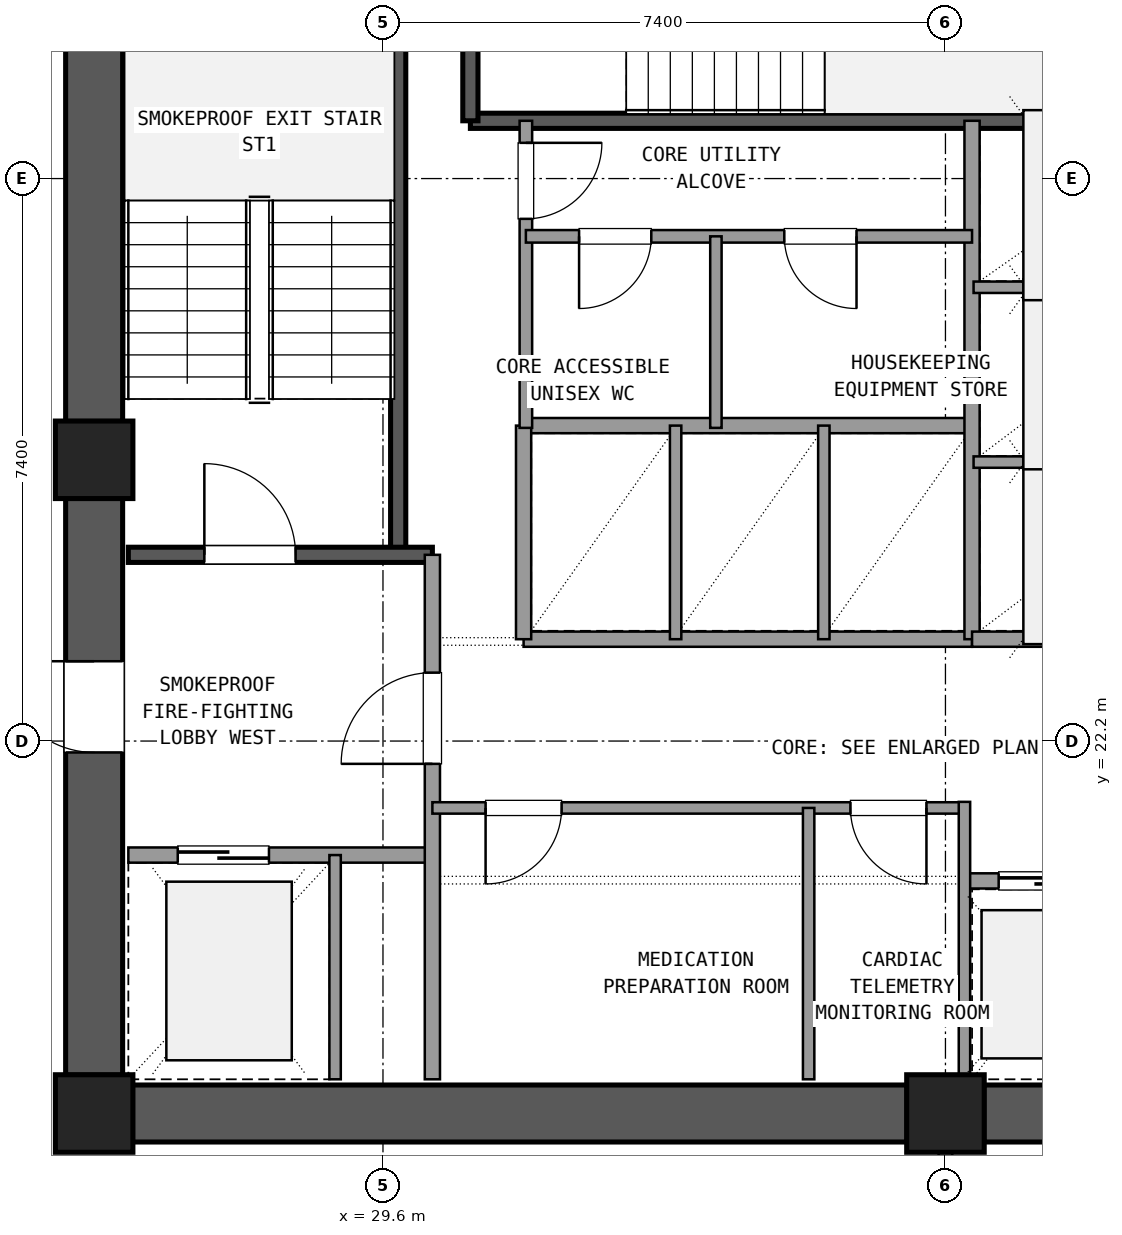
"""IFC4 building model, lengths in metres.
Left out: names, types, materials, properties, quantities, classifications, styles, units other than length and angle.
Written with IfcOpenShell. Run it as: python <this file> out.ifc"""

import sys

from ifc_helpers import new_model, si_unit, direction, frame, frame_2d, origin, origin_2d, place, context, subcontext, project, spatial, rectangle, extrude, element, fill, save


model = new_model("IFC4")
c1 = context("Model", 3, precision=1e-05, world=origin(), true_north=direction((0.0, 1.0)))
c2 = subcontext(c1, "Body", "Model", "MODEL_VIEW")
j1 = project(units=[si_unit("LENGTHUNIT", "METRE"), si_unit("PLANEANGLEUNIT", "RADIAN")], contexts=[c1])
p1 = place(None, origin())
s1 = spatial("IfcSite", under=j1, at=p1, CompositionType="ELEMENT")
p2 = place(p1, origin())
s2 = spatial("IfcBuilding", under=s1, at=p2, CompositionType="ELEMENT")
p3 = place(p2, frame((0.0, 0.0, 120.78)))
s3 = spatial("IfcBuildingStorey", under=s2, at=p3, CompositionType="ELEMENT", Elevation=120.78)
for number, where, z_axis, x_axis in (
    (1, (25.8, 17.3, 0.0), (0.0, 0.0, 1.0), (1.0, 0.0, 0.0)),
    (2, (37.0, 17.3, 0.0), (0.0, 0.0, 1.0), (1.0, 0.0, 0.0)),
    (3, (25.8, 25.9, 0.0), (0.0, 0.0, 1.0), (1.0, 0.0, 0.0)),
):
    element("IfcColumn", number, at=place(p3, frame(where, z_axis=z_axis, x_axis=x_axis)), inside=s3, PredefinedType="COLUMN", context=c2, shape_type="SweptSolid", body=[
        extrude(rectangle(XDim=1.02, YDim=1.02, at=origin_2d()), origin(), (0.0, 0.0, 1.0), 3.6),
    ])
for number, where, z_axis, x_axis in (
    (4, (26.305, 17.3, 0.0), (0.0, 0.0, 1.0), (1.0, 0.0, 0.0)),
    (5, (37.505, 17.3, 0.0), (0.0, 0.0, 1.0), (1.0, 0.0, 0.0)),
):
    element("IfcWall", number, at=place(p3, frame(where, z_axis=z_axis, x_axis=x_axis)), inside=s3, PredefinedType="SHEAR", context=c2, shape_type="SweptSolid", body=[
        extrude(rectangle(XDim=10.19, YDim=0.75, at=frame_2d((5.095, 0.0))), origin(), (0.0, 0.0, 1.0), 3.3),
    ])
p4 = place(p3, frame((25.8, 33.995, 0.0), z_axis=(0.0, 0.0, 1.0), x_axis=(0.0, -1.0, 0.0)))
e6 = element("IfcWall", 6, at=p4, inside=s3, PredefinedType="SHEAR", context=c2, shape_type="SweptSolid", body=[
    extrude(rectangle(XDim=7.59, YDim=0.75, at=frame_2d((3.795, 0.0))), origin(), (0.0, 0.0, 1.0), 3.3),
])
p5 = place(p3, frame((25.8, 25.395, 0.0), z_axis=(0.0, 0.0, 1.0), x_axis=(0.0, -1.0, 0.0)))
e7 = element("IfcWall", 7, at=p5, inside=s3, PredefinedType="SHEAR", context=c2, shape_type="SweptSolid", body=[
    extrude(rectangle(XDim=7.59, YDim=0.75, at=frame_2d((3.795, 0.0))), origin(), (0.0, 0.0, 1.0), 3.3),
])
p6 = place(p5, frame((2.145, 0.0, 0.0)))
e8 = element("IfcOpeningElement", 8, at=p6, cuts=e7, PredefinedType="OPENING", context=c2, shape_type="SweptSolid", body=[
    extrude(rectangle(XDim=1.2, YDim=2.15, at=frame_2d((0.6, 1.075))), frame((0.0, 0.385, 0.0), z_axis=(0.0, -1.0, 0.0), x_axis=(1.0, 0.0, 0.0)), (0.0, 0.0, 1.0), 0.77),
])
p7 = place(p3, frame((29.8, 24.65, 0.0), z_axis=(0.0, 0.0, 1.0), x_axis=(0.0, 1.0, 0.0)))
e9 = element("IfcWall", 9, at=p7, inside=s3, PredefinedType="SHEAR", context=c2, shape_type="SweptSolid", body=[
    extrude(rectangle(XDim=9.4, YDim=0.2, at=frame_2d((4.7, 0.0))), origin(), (0.0, 0.0, 1.0), 3.3),
])
p8 = place(p3, frame((26.25, 24.65, 0.0), z_axis=(0.0, 0.0, 1.0), x_axis=(1.0, 0.0, 0.0)))
e10 = element("IfcWall", 10, at=p8, inside=s3, PredefinedType="SHEAR", context=c2, shape_type="SweptSolid", body=[
    extrude(rectangle(XDim=4.0, YDim=0.2, at=frame_2d((2.0, 0.0))), origin(), (0.0, 0.0, 1.0), 3.3),
])
p9 = place(p8, frame((1.0, 0.0, 0.0)))
e11 = element("IfcOpeningElement", 11, at=p9, cuts=e10, PredefinedType="OPENING", context=c2, shape_type="SweptSolid", body=[
    extrude(rectangle(XDim=1.2, YDim=2.15, at=frame_2d((0.6, 1.075))), frame((0.0, 0.11, 0.0), z_axis=(0.0, -1.0, 0.0), x_axis=(1.0, 0.0, 0.0)), (0.0, 0.0, 1.0), 0.22),
])
p10 = place(p3, frame((30.75, 30.36, 0.0), z_axis=(0.0, 0.0, 1.0), x_axis=(1.0, 0.0, 0.0)))
e12 = element("IfcWall", 12, at=p10, inside=s3, PredefinedType="SHEAR", context=c2, shape_type="SweptSolid", body=[
    extrude(rectangle(XDim=9.5, YDim=0.2, at=frame_2d((4.75, 0.0))), origin(), (0.0, 0.0, 1.0), 3.3),
])
p11 = place(p3, frame((30.75, 30.36, 0.0), z_axis=(0.0, 0.0, 1.0), x_axis=(0.0, 1.0, 0.0)))
e13 = element("IfcWall", 13, at=p11, inside=s3, PredefinedType="SHEAR", context=c2, shape_type="SweptSolid", body=[
    extrude(rectangle(XDim=3.69, YDim=0.2, at=frame_2d((1.845, 0.0))), origin(), (0.0, 0.0, 1.0), 3.3),
])
p12 = place(p3, frame((26.25, 20.7, 0.0), z_axis=(0.0, 0.0, 1.0), x_axis=(1.0, 0.0, 0.0)))
e14 = element("IfcWall", 14, at=p12, inside=s3, PredefinedType="SOLIDWALL", context=c2, shape_type="SweptSolid", body=[
    extrude(rectangle(XDim=4.0, YDim=0.2, at=frame_2d((2.0, 0.0))), origin(), (0.0, 0.0, 1.0), 2.59),
])
p13 = place(p12, frame((0.65, 0.0, 0.0)))
e15 = element("IfcOpeningElement", 15, at=p13, cuts=e14, PredefinedType="OPENING", context=c2, shape_type="SweptSolid", body=[
    extrude(rectangle(XDim=1.2, YDim=2.15, at=frame_2d((0.6, 1.075))), frame((0.0, 0.11, 0.0), z_axis=(0.0, -1.0, 0.0), x_axis=(1.0, 0.0, 0.0)), (0.0, 0.0, 1.0), 0.22),
])
p14 = place(p3, frame((30.25, 17.75, 0.0), z_axis=(0.0, 0.0, 1.0), x_axis=(0.0, 1.0, 0.0)))
e16 = element("IfcWall", 16, at=p14, inside=s3, PredefinedType="SOLIDWALL", context=c2, shape_type="SweptSolid", body=[
    extrude(rectangle(XDim=6.9, YDim=0.2, at=frame_2d((3.45, 0.0))), origin(), (0.0, 0.0, 1.0), 2.59),
])
p15 = place(p14, frame((4.15, 0.0, 0.0)))
e17 = element("IfcOpeningElement", 17, at=p15, cuts=e16, PredefinedType="OPENING", context=c2, shape_type="SweptSolid", body=[
    extrude(rectangle(XDim=1.2, YDim=2.15, at=frame_2d((0.6, 1.075))), frame((0.0, 0.11, 0.0), z_axis=(0.0, -1.0, 0.0), x_axis=(1.0, 0.0, 0.0)), (0.0, 0.0, 1.0), 0.22),
])
p16 = place(p3, frame((28.97, 17.75, 0.0), z_axis=(0.0, 0.0, 1.0), x_axis=(0.0, 1.0, 0.0)))
e18 = element("IfcWall", 18, at=p16, inside=s3, PredefinedType="PARTITIONING", context=c2, shape_type="SweptSolid", body=[
    extrude(rectangle(XDim=2.95, YDim=0.15, at=frame_2d((1.475, 0.0))), origin(), (0.0, 0.0, 1.0), 2.59),
])
p17 = place(p3, frame((30.25, 21.32, 0.0), z_axis=(0.0, 0.0, 1.0), x_axis=(1.0, 0.0, 0.0)))
e19 = element("IfcWall", 19, at=p17, inside=s3, PredefinedType="PARTITIONING", context=c2, shape_type="SweptSolid", body=[
    extrude(rectangle(XDim=7.0, YDim=0.15, at=frame_2d((3.5, 0.0))), origin(), (0.0, 0.0, 1.0), 2.59),
])
p18 = place(p17, frame((0.7, 0.0, 0.0)))
e20 = element("IfcOpeningElement", 20, at=p18, cuts=e19, PredefinedType="OPENING", context=c2, shape_type="SweptSolid", body=[
    extrude(rectangle(XDim=1.0, YDim=2.15, at=frame_2d((0.5, 1.075))), frame((0.0, 0.085, 0.0), z_axis=(0.0, -1.0, 0.0), x_axis=(1.0, 0.0, 0.0)), (0.0, 0.0, 1.0), 0.17),
])
p19 = place(p17, frame((5.5, 0.0, 0.0)))
e21 = element("IfcOpeningElement", 21, at=p19, cuts=e19, PredefinedType="OPENING", context=c2, shape_type="SweptSolid", body=[
    extrude(rectangle(XDim=1.0, YDim=2.15, at=frame_2d((0.5, 1.075))), frame((0.0, 0.085, 0.0), z_axis=(0.0, -1.0, 0.0), x_axis=(1.0, 0.0, 0.0)), (0.0, 0.0, 1.0), 0.17),
])
p20 = place(p3, frame((35.2, 17.75, 0.0), z_axis=(0.0, 0.0, 1.0), x_axis=(0.0, 1.0, 0.0)))
e22 = element("IfcWall", 22, at=p20, inside=s3, PredefinedType="PARTITIONING", context=c2, shape_type="SweptSolid", body=[
    extrude(rectangle(XDim=3.57, YDim=0.15, at=frame_2d((1.785, 0.0))), origin(), (0.0, 0.0, 1.0), 2.59),
])
p21 = place(p3, frame((37.25, 20.36, 0.0), z_axis=(0.0, 0.0, 1.0), x_axis=(1.0, 0.0, 0.0)))
e23 = element("IfcWall", 23, at=p21, inside=s3, PredefinedType="SOLIDWALL", context=c2, shape_type="SweptSolid", body=[
    extrude(rectangle(XDim=6.1, YDim=0.2, at=frame_2d((3.05, 0.0))), origin(), (0.0, 0.0, 1.0), 2.59),
])
p22 = place(p21, frame((0.45, 0.0, 0.0)))
e24 = element("IfcOpeningElement", 24, at=p22, cuts=e23, PredefinedType="OPENING", context=c2, shape_type="SweptSolid", body=[
    extrude(rectangle(XDim=1.1, YDim=2.15, at=frame_2d((0.55, 1.075))), frame((0.0, 0.11, 0.0), z_axis=(0.0, -1.0, 0.0), x_axis=(1.0, 0.0, 0.0)), (0.0, 0.0, 1.0), 0.22),
])
p23 = place(p21, frame((2.5, 0.0, 0.0)))
e25 = element("IfcOpeningElement", 25, at=p23, cuts=e23, PredefinedType="OPENING", context=c2, shape_type="SweptSolid", body=[
    extrude(rectangle(XDim=1.1, YDim=2.15, at=frame_2d((0.55, 1.075))), frame((0.0, 0.11, 0.0), z_axis=(0.0, -1.0, 0.0), x_axis=(1.0, 0.0, 0.0)), (0.0, 0.0, 1.0), 0.22),
])
p24 = place(p21, frame((4.55, 0.0, 0.0)))
e26 = element("IfcOpeningElement", 26, at=p24, cuts=e23, PredefinedType="OPENING", context=c2, shape_type="SweptSolid", body=[
    extrude(rectangle(XDim=1.1, YDim=2.15, at=frame_2d((0.55, 1.075))), frame((0.0, 0.11, 0.0), z_axis=(0.0, -1.0, 0.0), x_axis=(1.0, 0.0, 0.0)), (0.0, 0.0, 1.0), 0.22),
])
p25 = place(p3, frame((37.25, 17.75, 0.0), z_axis=(0.0, 0.0, 1.0), x_axis=(0.0, 1.0, 0.0)))
e27 = element("IfcWall", 27, at=p25, inside=s3, PredefinedType="PARTITIONING", context=c2, shape_type="SweptSolid", body=[
    extrude(rectangle(XDim=3.65, YDim=0.15, at=frame_2d((1.825, 0.0))), origin(), (0.0, 0.0, 1.0), 2.59),
])
for number, where, z_axis, x_axis in (
    (28, (31.45, 23.54, 0.0), (0.0, 0.0, 1.0), (1.0, 0.0, 0.0)),
    (29, (31.45, 26.35, 0.0), (0.0, 0.0, 1.0), (1.0, 0.0, 0.0)),
):
    element("IfcWall", number, at=place(p3, frame(where, z_axis=z_axis, x_axis=x_axis)), inside=s3, PredefinedType="SOLIDWALL", context=c2, shape_type="SweptSolid", body=[
        extrude(rectangle(XDim=5.9, YDim=0.2, at=frame_2d((2.95, 0.0))), origin(), (0.0, 0.0, 1.0), 2.59),
    ])
p26 = place(p3, frame((31.45, 23.54, 0.0), z_axis=(0.0, 0.0, 1.0), x_axis=(0.0, 1.0, 0.0)))
e30 = element("IfcWall", 30, at=p26, inside=s3, PredefinedType="SOLIDWALL", context=c2, shape_type="SweptSolid", body=[
    extrude(rectangle(XDim=2.81, YDim=0.2, at=frame_2d((1.405, 0.0))), origin(), (0.0, 0.0, 1.0), 2.59),
])
for number, where, z_axis, x_axis in (
    (31, (33.45, 23.54, 0.0), (0.0, 0.0, 1.0), (0.0, 1.0, 0.0)),
    (32, (35.4, 23.54, 0.0), (0.0, 0.0, 1.0), (0.0, 1.0, 0.0)),
):
    element("IfcWall", number, at=place(p3, frame(where, z_axis=z_axis, x_axis=x_axis)), inside=s3, PredefinedType="PARTITIONING", context=c2, shape_type="SweptSolid", body=[
        extrude(rectangle(XDim=2.81, YDim=0.15, at=frame_2d((1.405, 0.0))), origin(), (0.0, 0.0, 1.0), 2.59),
    ])
p27 = place(p3, frame((37.35, 23.54, 0.0), z_axis=(0.0, 0.0, 1.0), x_axis=(0.0, 1.0, 0.0)))
e33 = element("IfcWall", 33, at=p27, inside=s3, PredefinedType="SOLIDWALL", context=c2, shape_type="SweptSolid", body=[
    extrude(rectangle(XDim=6.82, YDim=0.2, at=frame_2d((3.41, 0.0))), origin(), (0.0, 0.0, 1.0), 2.59),
])
p28 = place(p3, frame((37.35, 23.54, 0.0), z_axis=(0.0, 0.0, 1.0), x_axis=(1.0, 0.0, 0.0)))
e34 = element("IfcWall", 34, at=p28, inside=s3, PredefinedType="SOLIDWALL", context=c2, shape_type="SweptSolid", body=[
    extrude(rectangle(XDim=3.05, YDim=0.2, at=frame_2d((1.525, 0.0))), origin(), (0.0, 0.0, 1.0), 2.59),
])
for number, where, z_axis, x_axis in (
    (35, (37.37, 25.87, 0.0), (0.0, 0.0, 1.0), (1.0, 0.0, 0.0)),
    (36, (37.37, 28.17, 0.0), (0.0, 0.0, 1.0), (1.0, 0.0, 0.0)),
):
    element("IfcWall", number, at=place(p3, frame(where, z_axis=z_axis, x_axis=x_axis)), inside=s3, PredefinedType="PARTITIONING", context=c2, shape_type="SweptSolid", body=[
        extrude(rectangle(XDim=3.01, YDim=0.15, at=frame_2d((1.505, 0.0))), origin(), (0.0, 0.0, 1.0), 2.59),
    ])
p29 = place(p3, frame((31.48, 26.32, 0.0), z_axis=(0.0, 0.0, 1.0), x_axis=(0.0, 1.0, 0.0)))
e37 = element("IfcWall", 37, at=p29, inside=s3, PredefinedType="PLUMBINGWALL", context=c2, shape_type="SweptSolid", body=[
    extrude(rectangle(XDim=4.04, YDim=0.165, at=frame_2d((2.02, 0.0))), origin(), (0.0, 0.0, 1.0), 2.59),
])
p30 = place(p29, frame((2.75, 0.0, 0.0)))
e38 = element("IfcOpeningElement", 38, at=p30, cuts=e37, PredefinedType="OPENING", context=c2, shape_type="SweptSolid", body=[
    extrude(rectangle(XDim=1.0, YDim=2.15, at=frame_2d((0.5, 1.075))), frame((0.0, 0.093, 0.0), z_axis=(0.0, -1.0, 0.0), x_axis=(1.0, 0.0, 0.0)), (0.0, 0.0, 1.0), 0.185),
])
p31 = place(p3, frame((31.48, 28.84, 0.0), z_axis=(0.0, 0.0, 1.0), x_axis=(1.0, 0.0, 0.0)))
e39 = element("IfcWall", 39, at=p31, inside=s3, PredefinedType="PLUMBINGWALL", context=c2, shape_type="SweptSolid", body=[
    extrude(rectangle(XDim=5.87, YDim=0.165, at=frame_2d((2.935, 0.0))), origin(), (0.0, 0.0, 1.0), 2.59),
])
p32 = place(p31, frame((0.7, 0.0, 0.0)))
e40 = element("IfcOpeningElement", 40, at=p32, cuts=e39, PredefinedType="OPENING", context=c2, shape_type="SweptSolid", body=[
    extrude(rectangle(XDim=0.95, YDim=2.1, at=frame_2d((0.475, 1.05))), frame((0.0, 0.093, 0.0), z_axis=(0.0, -1.0, 0.0), x_axis=(1.0, 0.0, 0.0)), (0.0, 0.0, 1.0), 0.185),
])
p33 = place(p31, frame((3.4, 0.0, 0.0)))
e41 = element("IfcOpeningElement", 41, at=p33, cuts=e39, PredefinedType="OPENING", context=c2, shape_type="SweptSolid", body=[
    extrude(rectangle(XDim=0.95, YDim=2.1, at=frame_2d((0.475, 1.05))), frame((0.0, 0.093, 0.0), z_axis=(0.0, -1.0, 0.0), x_axis=(1.0, 0.0, 0.0)), (0.0, 0.0, 1.0), 0.185),
])
p34 = place(p3, frame((33.98, 26.32, 0.0), z_axis=(0.0, 0.0, 1.0), x_axis=(0.0, 1.0, 0.0)))
e42 = element("IfcWall", 42, at=p34, inside=s3, PredefinedType="PARTITIONING", context=c2, shape_type="SweptSolid", body=[
    extrude(rectangle(XDim=2.52, YDim=0.15, at=frame_2d((1.26, 0.0))), origin(), (0.0, 0.0, 1.0), 2.59),
])
p35 = place(p3, frame((37.0, 13.64, 0.0), z_axis=(0.0, 0.0, 1.0), x_axis=(0.0, 1.0, 0.0)))
e43 = element("IfcWall", 43, at=p35, inside=s3, PredefinedType="PARTITIONING", context=c2, shape_type="SweptSolid", body=[
    extrude(rectangle(XDim=3.21, YDim=0.18, at=frame_2d((1.605, 0.0))), origin(), (0.0, 0.0, 1.0), 2.59),
])
p36 = place(p35, frame((0.605, 0.0, 0.0)))
e44 = element("IfcOpeningElement", 44, at=p36, cuts=e43, PredefinedType="OPENING", context=c2, shape_type="SweptSolid", body=[
    extrude(rectangle(XDim=2.0, YDim=2.2, at=frame_2d((1.0, 1.1))), frame((0.0, 0.1, 0.0), z_axis=(0.0, -1.0, 0.0), x_axis=(1.0, 0.0, 0.0)), (0.0, 0.0, 1.0), 0.2),
])
p37 = place(p9, origin())
e45 = element("IfcDoor", 45, at=p37, inside=s3, OperationType="SINGLE_SWING_LEFT", PredefinedType="DOOR", context=c2, shape_type="SweptSolid", body=[
    extrude(rectangle(XDim=1.2, YDim=2.15, at=frame_2d((0.6, 1.075))), frame((0.0, 0.025, 0.0), z_axis=(0.0, -1.0, 0.0), x_axis=(1.0, 0.0, 0.0)), (0.0, 0.0, 1.0), 0.05),
])
fill(e11, e45)
p38 = place(p13, origin())
e46 = element("IfcDoor", 46, at=p38, inside=s3, OperationType="SLIDING_TO_LEFT", PredefinedType="DOOR", context=c2, shape_type="SweptSolid", body=[
    extrude(rectangle(XDim=1.2, YDim=2.15, at=frame_2d((0.6, 1.075))), frame((0.0, 0.025, 0.0), z_axis=(0.0, -1.0, 0.0), x_axis=(1.0, 0.0, 0.0)), (0.0, 0.0, 1.0), 0.05),
])
fill(e15, e46)
p39 = place(p15, origin())
e47 = element("IfcDoor", 47, at=p39, inside=s3, OperationType="SINGLE_SWING_LEFT", PredefinedType="DOOR", context=c2, shape_type="SweptSolid", body=[
    extrude(rectangle(XDim=1.2, YDim=2.15, at=frame_2d((0.6, 1.075))), frame((0.0, 0.025, 0.0), z_axis=(0.0, -1.0, 0.0), x_axis=(1.0, 0.0, 0.0)), (0.0, 0.0, 1.0), 0.05),
])
fill(e17, e47)
p40 = place(p6, frame((1.2, 0.0, 0.0), z_axis=(0.0, 0.0, 1.0), x_axis=(-1.0, 0.0, 0.0)))
e48 = element("IfcDoor", 48, at=p40, inside=s3, OperationType="SINGLE_SWING_LEFT", PredefinedType="DOOR", context=c2, shape_type="SweptSolid", body=[
    extrude(rectangle(XDim=1.2, YDim=2.15, at=frame_2d((0.6, 1.075))), frame((0.0, 0.025, 0.0), z_axis=(0.0, -1.0, 0.0), x_axis=(1.0, 0.0, 0.0)), (0.0, 0.0, 1.0), 0.05),
])
fill(e8, e48)
p41 = place(p18, frame((1.0, 0.0, 0.0), z_axis=(0.0, 0.0, 1.0), x_axis=(-1.0, 0.0, 0.0)))
e49 = element("IfcDoor", 49, at=p41, inside=s3, OperationType="SINGLE_SWING_LEFT", PredefinedType="DOOR", context=c2, shape_type="SweptSolid", body=[
    extrude(rectangle(XDim=1.0, YDim=2.15, at=frame_2d((0.5, 1.075))), frame((0.0, 0.025, 0.0), z_axis=(0.0, -1.0, 0.0), x_axis=(1.0, 0.0, 0.0)), (0.0, 0.0, 1.0), 0.05),
])
fill(e20, e49)
p42 = place(p19, frame((1.0, 0.0, 0.0), z_axis=(0.0, 0.0, 1.0), x_axis=(-1.0, 0.0, 0.0)))
e50 = element("IfcDoor", 50, at=p42, inside=s3, OperationType="SINGLE_SWING_RIGHT", PredefinedType="DOOR", context=c2, shape_type="SweptSolid", body=[
    extrude(rectangle(XDim=1.0, YDim=2.15, at=frame_2d((0.5, 1.075))), frame((0.0, 0.025, 0.0), z_axis=(0.0, -1.0, 0.0), x_axis=(1.0, 0.0, 0.0)), (0.0, 0.0, 1.0), 0.05),
])
fill(e21, e50)
p43 = place(p22, origin())
e51 = element("IfcDoor", 51, at=p43, inside=s3, OperationType="SLIDING_TO_LEFT", PredefinedType="DOOR", context=c2, shape_type="SweptSolid", body=[
    extrude(rectangle(XDim=1.1, YDim=2.15, at=frame_2d((0.55, 1.075))), frame((0.0, 0.025, 0.0), z_axis=(0.0, -1.0, 0.0), x_axis=(1.0, 0.0, 0.0)), (0.0, 0.0, 1.0), 0.05),
])
fill(e24, e51)
p44 = place(p30, frame((1.0, 0.0, 0.0), z_axis=(0.0, 0.0, 1.0), x_axis=(-1.0, 0.0, 0.0)))
e52 = element("IfcDoor", 52, at=p44, inside=s3, OperationType="SINGLE_SWING_RIGHT", PredefinedType="DOOR", context=c2, shape_type="SweptSolid", body=[
    extrude(rectangle(XDim=1.0, YDim=2.15, at=frame_2d((0.5, 1.075))), frame((0.0, 0.025, 0.0), z_axis=(0.0, -1.0, 0.0), x_axis=(1.0, 0.0, 0.0)), (0.0, 0.0, 1.0), 0.05),
])
fill(e38, e52)
p45 = place(p32, frame((0.95, 0.0, 0.0), z_axis=(0.0, 0.0, 1.0), x_axis=(-1.0, 0.0, 0.0)))
e53 = element("IfcDoor", 53, at=p45, inside=s3, OperationType="SINGLE_SWING_LEFT", PredefinedType="DOOR", context=c2, shape_type="SweptSolid", body=[
    extrude(rectangle(XDim=0.95, YDim=2.1, at=frame_2d((0.475, 1.05))), frame((0.0, 0.025, 0.0), z_axis=(0.0, -1.0, 0.0), x_axis=(1.0, 0.0, 0.0)), (0.0, 0.0, 1.0), 0.05),
])
fill(e40, e53)
p46 = place(p33, frame((0.95, 0.0, 0.0), z_axis=(0.0, 0.0, 1.0), x_axis=(-1.0, 0.0, 0.0)))
e54 = element("IfcDoor", 54, at=p46, inside=s3, OperationType="SINGLE_SWING_RIGHT", PredefinedType="DOOR", context=c2, shape_type="SweptSolid", body=[
    extrude(rectangle(XDim=0.95, YDim=2.1, at=frame_2d((0.475, 1.05))), frame((0.0, 0.025, 0.0), z_axis=(0.0, -1.0, 0.0), x_axis=(1.0, 0.0, 0.0)), (0.0, 0.0, 1.0), 0.05),
])
fill(e41, e54)
save(model, sys.argv[1])
